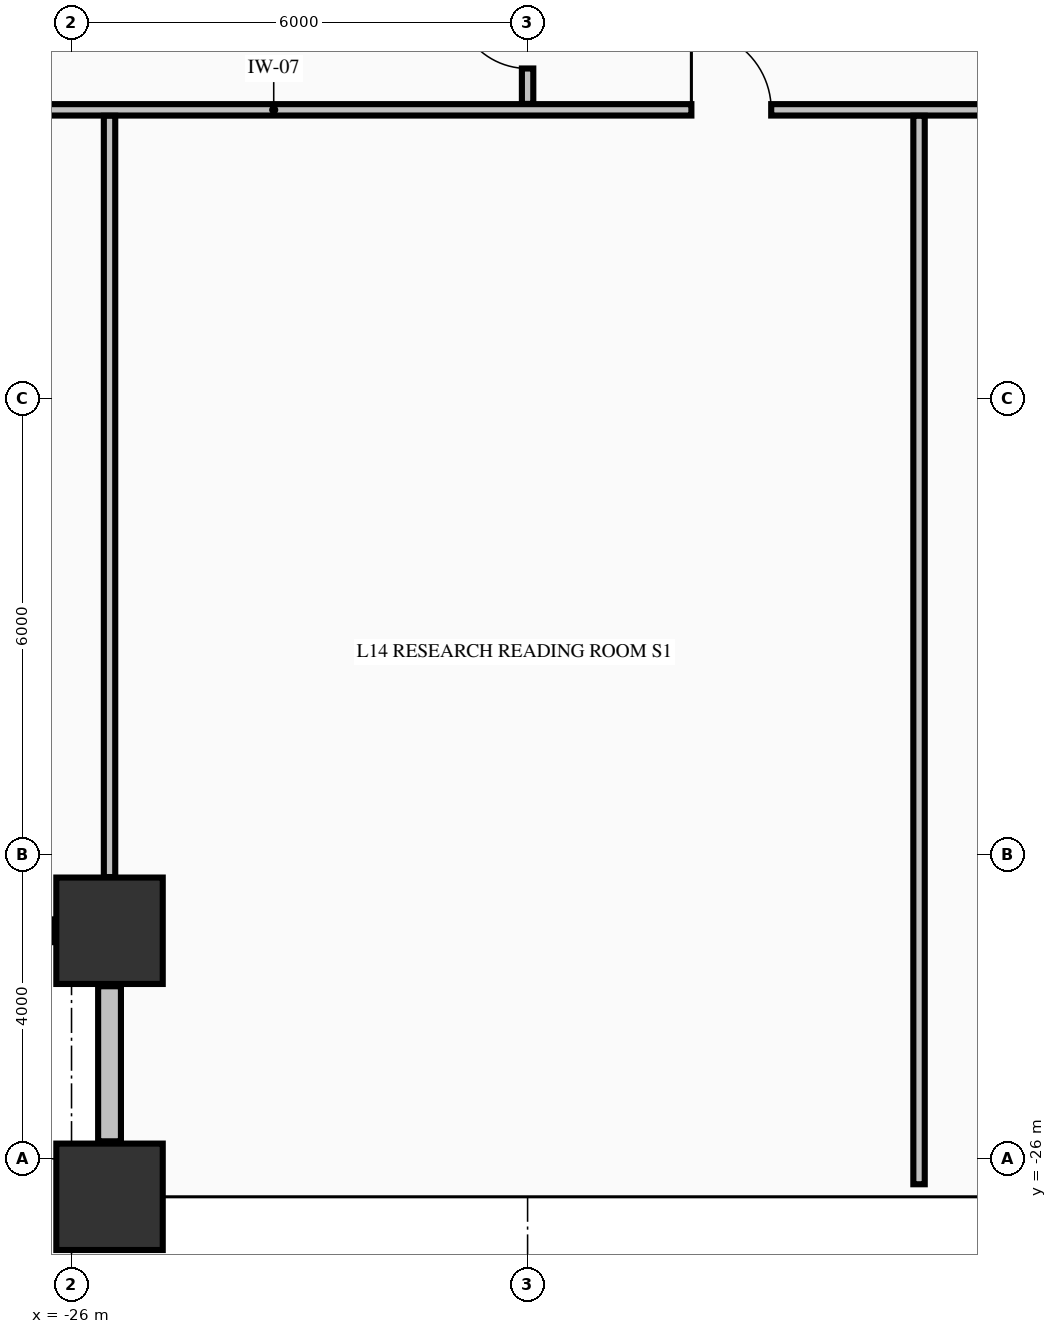
"""IFC4 building model, lengths in metres.
Left out: names, types, materials, properties, quantities, classifications, styles, units other than length and angle.
Written with IfcOpenShell. Run it as: python <this file> out.ifc"""

import sys

from ifc_helpers import new_model, si_unit, direction, frame, frame_2d, origin, origin_2d, place, context, subcontext, project, spatial, rectangle, extrude, element, fill, save


model = new_model("IFC4")
c1 = context("Model", 3, precision=1e-05, world=origin(), true_north=direction((0.0, 1.0)))
c2 = subcontext(c1, "Body", "Model", "MODEL_VIEW")
j1 = project(units=[si_unit("LENGTHUNIT", "METRE"), si_unit("PLANEANGLEUNIT", "RADIAN")], contexts=[c1])
p1 = place(None, origin())
s1 = spatial("IfcSite", under=j1, at=p1, CompositionType="ELEMENT")
p2 = place(p1, origin())
s2 = spatial("IfcBuilding", under=s1, at=p2, CompositionType="ELEMENT")
p3 = place(p2, frame((0.0, 0.0, 60.76)))
s3 = spatial("IfcBuildingStorey", under=s2, at=p3, CompositionType="ELEMENT", Elevation=60.76)
for number, where, z_axis, x_axis in (
    (1, (-25.5, -26.5, -0.3), (0.0, 0.0, 1.0), (1.0, 0.0, 0.0)),
    (2, (-25.5, -23.0, -0.3), (0.0, 0.0, 1.0), (1.0, 0.0, 0.0)),
):
    element("IfcColumn", number, at=place(p3, frame(where, z_axis=z_axis, x_axis=x_axis)), inside=s3, PredefinedType="COLUMN", context=c2, shape_type="SweptSolid", body=[
        extrude(rectangle(XDim=1.4, YDim=1.4, at=origin_2d()), origin(), (0.0, 0.0, 1.0), 3.62),
    ])
for number, where, z_axis, x_axis in (
    (3, (-28.27, -23.0, 0.0), (0.0, 0.0, 1.0), (1.0, 0.0, 0.0)),
    (4, (-25.5, -23.73, 0.0), (0.0, 0.0, 1.0), (0.0, -1.0, 0.0)),
):
    element("IfcWall", number, at=place(p3, frame(where, z_axis=z_axis, x_axis=x_axis)), inside=s3, PredefinedType="STANDARD", context=c2, shape_type="SweptSolid", body=[
        extrude(rectangle(XDim=2.04, YDim=0.3, at=frame_2d((1.02, 0.0))), origin(), (0.0, 0.0, 1.0), 1.512),
    ])
p4 = place(p3, frame((-28.835, -12.2, 0.0), z_axis=(0.0, 0.0, 1.0), x_axis=(1.0, 0.0, 0.0)))
e5 = element("IfcWall", 5, at=p4, inside=s3, PredefinedType="PARTITIONING", context=c2, shape_type="SweptSolid", body=[
    extrude(rectangle(XDim=52.67, YDim=0.15, at=frame_2d((26.335, 0.0))), origin(), (0.0, 0.0, 1.0), 3.32),
])
p5 = place(p4, frame((10.99, 0.0, 0.0)))
e6 = element("IfcOpeningElement", 6, at=p5, cuts=e5, PredefinedType="OPENING", context=c2, shape_type="SweptSolid", body=[
    extrude(rectangle(XDim=1.05, YDim=2.15, at=frame_2d((0.525, 1.075))), frame((0.0, 0.085, 0.0), z_axis=(0.0, -1.0, 0.0), x_axis=(1.0, 0.0, 0.0)), (0.0, 0.0, 1.0), 0.17),
])
p6 = place(p4, frame((18.86, 0.0, 0.0)))
e7 = element("IfcOpeningElement", 7, at=p6, cuts=e5, PredefinedType="OPENING", context=c2, shape_type="SweptSolid", body=[
    extrude(rectangle(XDim=0.95, YDim=2.15, at=frame_2d((0.475, 1.075))), frame((0.0, 0.085, 0.0), z_axis=(0.0, -1.0, 0.0), x_axis=(1.0, 0.0, 0.0)), (0.0, 0.0, 1.0), 0.17),
])
p7 = place(p4, frame((23.21, 0.0, 0.0)))
e8 = element("IfcOpeningElement", 8, at=p7, cuts=e5, PredefinedType="OPENING", context=c2, shape_type="SweptSolid", body=[
    extrude(rectangle(XDim=0.95, YDim=2.15, at=frame_2d((0.475, 1.075))), frame((0.0, 0.085, 0.0), z_axis=(0.0, -1.0, 0.0), x_axis=(1.0, 0.0, 0.0)), (0.0, 0.0, 1.0), 0.17),
])
p8 = place(p4, frame((27.56, 0.0, 0.0)))
e9 = element("IfcOpeningElement", 9, at=p8, cuts=e5, PredefinedType="OPENING", context=c2, shape_type="SweptSolid", body=[
    extrude(rectangle(XDim=0.95, YDim=2.15, at=frame_2d((0.475, 1.075))), frame((0.0, 0.085, 0.0), z_axis=(0.0, -1.0, 0.0), x_axis=(1.0, 0.0, 0.0)), (0.0, 0.0, 1.0), 0.17),
])
p9 = place(p4, frame((36.86, 0.0, 0.0)))
e10 = element("IfcOpeningElement", 10, at=p9, cuts=e5, PredefinedType="OPENING", context=c2, shape_type="SweptSolid", body=[
    extrude(rectangle(XDim=1.05, YDim=2.15, at=frame_2d((0.525, 1.075))), frame((0.0, 0.085, 0.0), z_axis=(0.0, -1.0, 0.0), x_axis=(1.0, 0.0, 0.0)), (0.0, 0.0, 1.0), 0.17),
])
p10 = place(p4, frame((44.84, 0.0, 0.0)))
e11 = element("IfcOpeningElement", 11, at=p10, cuts=e5, PredefinedType="OPENING", context=c2, shape_type="SweptSolid", body=[
    extrude(rectangle(XDim=0.95, YDim=2.15, at=frame_2d((0.475, 1.075))), frame((0.0, 0.085, 0.0), z_axis=(0.0, -1.0, 0.0), x_axis=(1.0, 0.0, 0.0)), (0.0, 0.0, 1.0), 0.17),
])
p11 = place(p3, frame((-25.5, -22.294, 0.0), z_axis=(0.0, 0.0, 1.0), x_axis=(0.0, 1.0, 0.0)))
e12 = element("IfcWall", 12, at=p11, inside=s3, PredefinedType="PARTITIONING", context=c2, shape_type="SweptSolid", body=[
    extrude(rectangle(XDim=10.016, YDim=0.15, at=frame_2d((5.008, 0.0))), origin(), (0.0, 0.0, 1.0), 3.32),
])
p12 = place(p3, frame((-20.0, -12.122, 0.0), z_axis=(0.0, 0.0, 1.0), x_axis=(0.0, 1.0, 0.0)))
e13 = element("IfcWall", 13, at=p12, inside=s3, PredefinedType="PARTITIONING", context=c2, shape_type="SweptSolid", body=[
    extrude(rectangle(XDim=1.566, YDim=0.15, at=frame_2d((0.783, 0.0))), origin(), (0.0, 0.0, 1.0), 2.66),
])
p13 = place(p12, frame((0.466, 0.0, 0.0)))
e14 = element("IfcOpeningElement", 14, at=p13, cuts=e13, PredefinedType="OPENING", context=c2, shape_type="SweptSolid", body=[
    extrude(rectangle(XDim=0.95, YDim=2.15, at=frame_2d((0.475, 1.075))), frame((0.0, 0.085, 0.0), z_axis=(0.0, -1.0, 0.0), x_axis=(1.0, 0.0, 0.0)), (0.0, 0.0, 1.0), 0.17),
])
p14 = place(p3, frame((-14.85, -26.335, 0.0), z_axis=(0.0, 0.0, 1.0), x_axis=(0.0, 1.0, 0.0)))
e15 = element("IfcWall", 15, at=p14, inside=s3, PredefinedType="PARTITIONING", context=c2, shape_type="SweptSolid", body=[
    extrude(rectangle(XDim=14.057, YDim=0.15, at=frame_2d((7.028, 0.0))), origin(), (0.0, 0.0, 1.0), 3.32),
])
p15 = place(p5, origin())
e16 = element("IfcDoor", 16, at=p15, inside=s3, OperationType="SINGLE_SWING_LEFT", PredefinedType="DOOR", context=c2, shape_type="SweptSolid", body=[
    extrude(rectangle(XDim=1.05, YDim=2.15, at=frame_2d((0.525, 1.075))), frame((0.0, 0.025, 0.0), z_axis=(0.0, -1.0, 0.0), x_axis=(1.0, 0.0, 0.0)), (0.0, 0.0, 1.0), 0.05),
])
fill(e6, e16)
p16 = place(p13, origin())
e17 = element("IfcDoor", 17, at=p16, inside=s3, OperationType="SINGLE_SWING_RIGHT", PredefinedType="DOOR", context=c2, shape_type="SweptSolid", body=[
    extrude(rectangle(XDim=0.95, YDim=2.15, at=frame_2d((0.475, 1.075))), frame((0.0, 0.025, 0.0), z_axis=(0.0, -1.0, 0.0), x_axis=(1.0, 0.0, 0.0)), (0.0, 0.0, 1.0), 0.05),
])
fill(e14, e17)
save(model, sys.argv[1])
